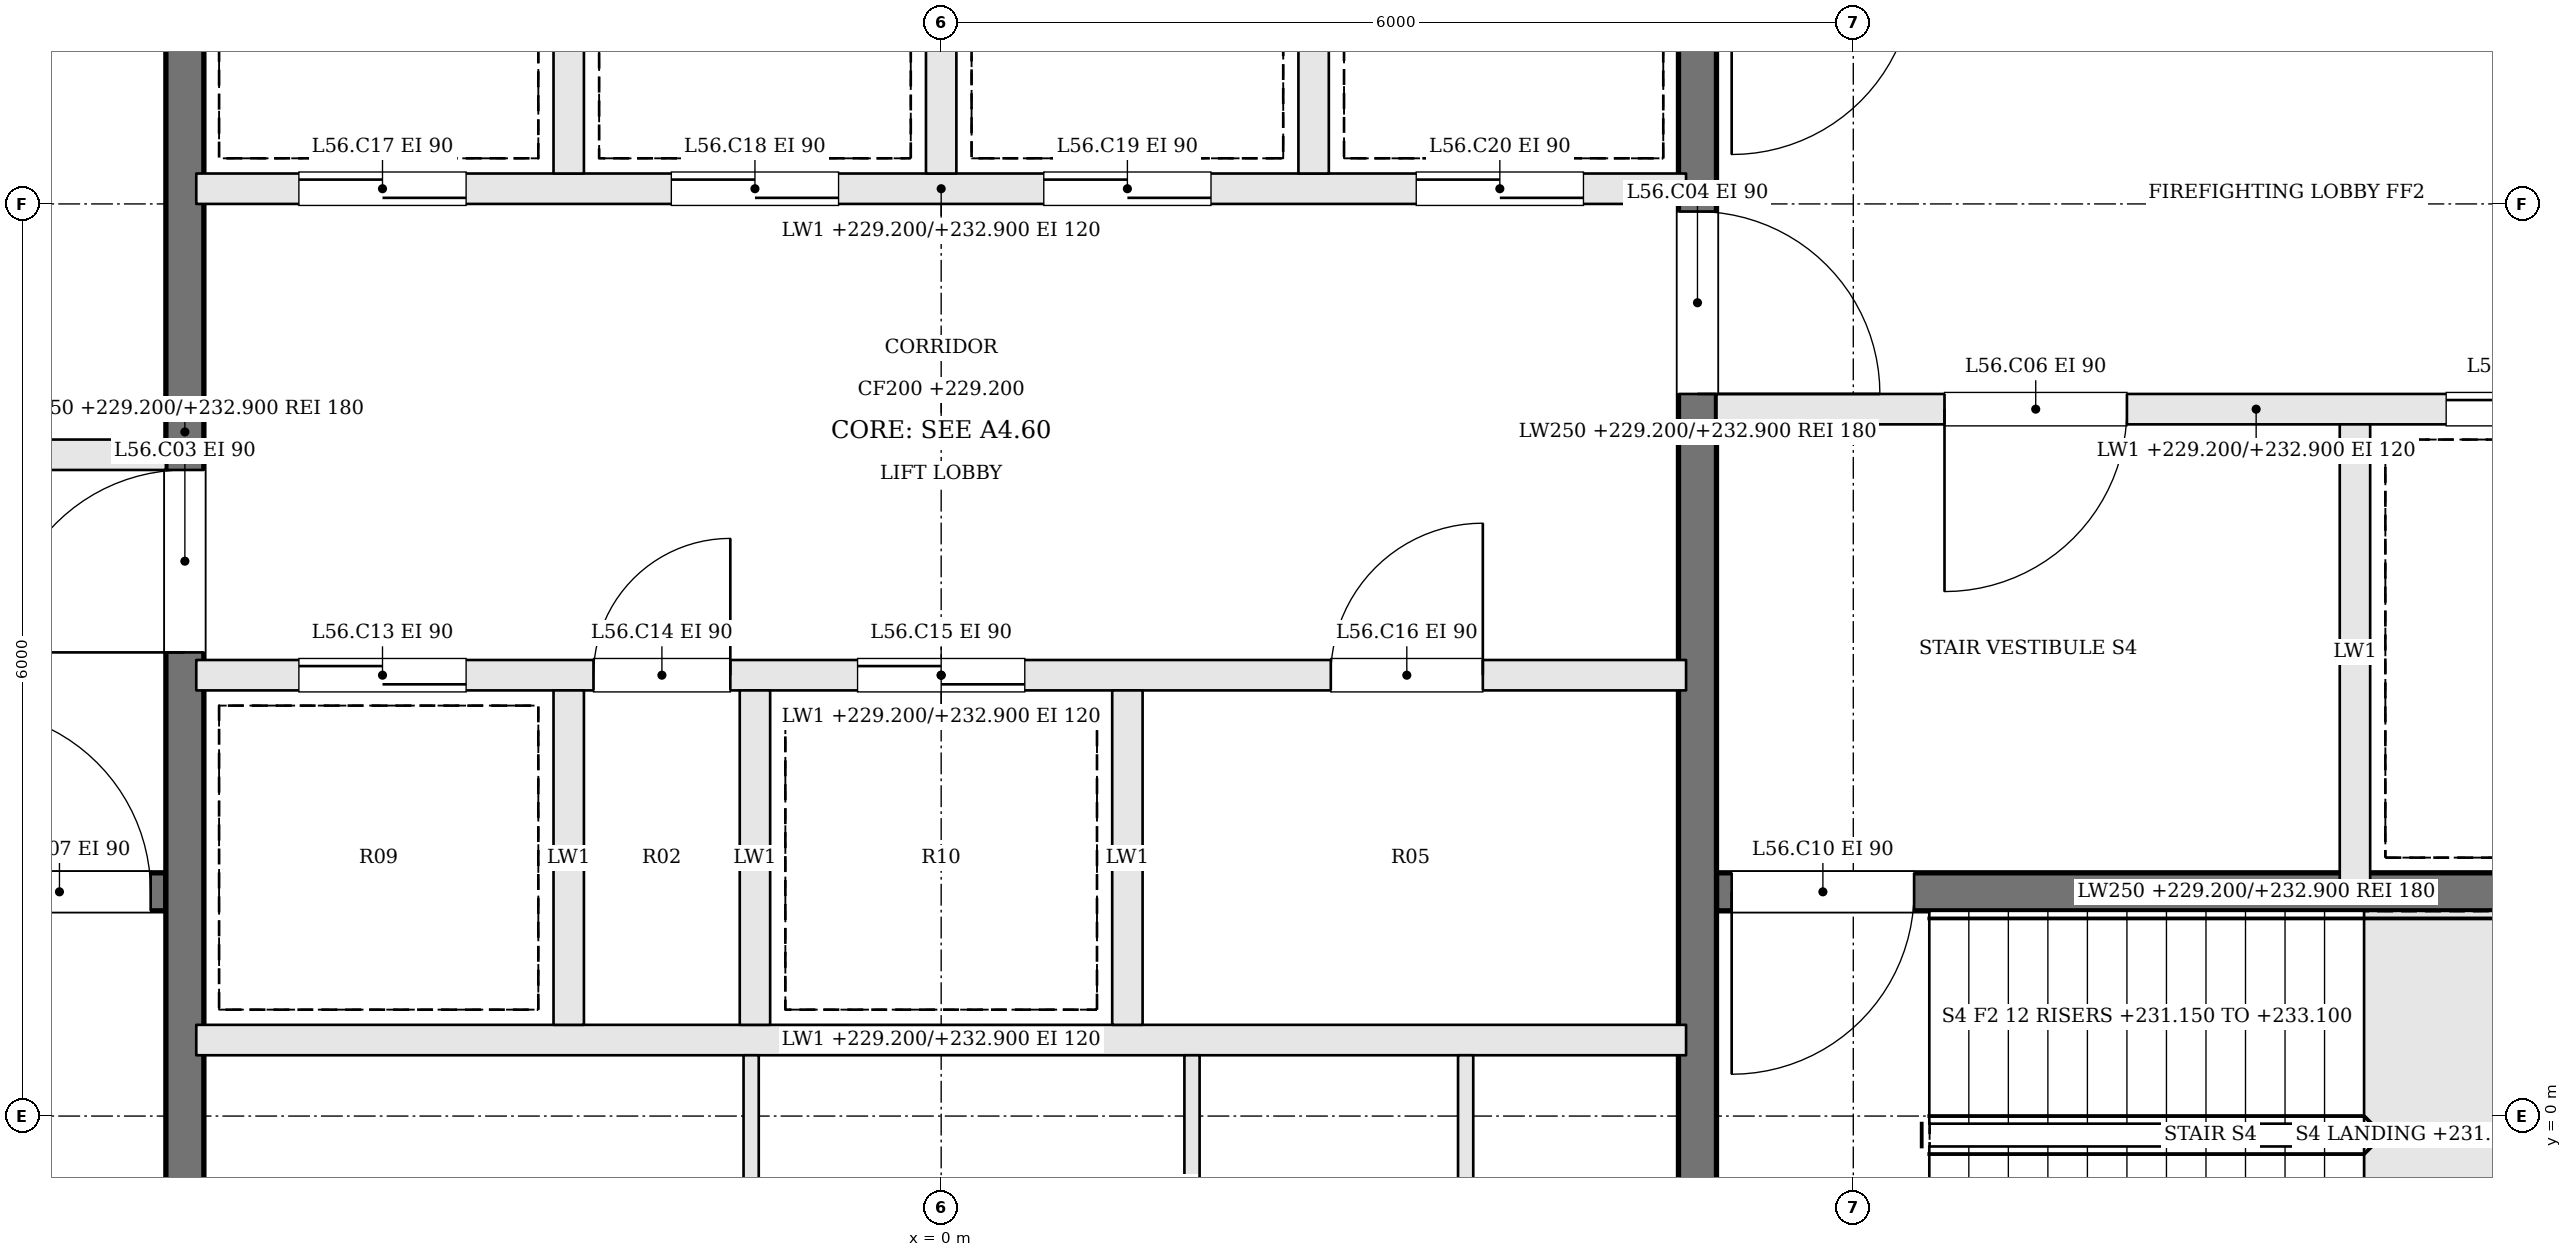
"""IFC4 building model, lengths in metres.
Left out: names, types, materials, properties, quantities, classifications, styles, units other than length and angle.
Written with IfcOpenShell. Run it as: python <this file> out.ifc"""

import sys

from ifc_helpers import new_model, si_unit, direction, frame, frame_2d, origin, place, context, subcontext, project, spatial, rectangle, extrude, element, fill, save


model = new_model("IFC4")
c1 = context("Model", 3, precision=1e-05, world=origin(), true_north=direction((0.0, 1.0)))
c2 = subcontext(c1, "Body", "Model", "MODEL_VIEW")
j1 = project(units=[si_unit("LENGTHUNIT", "METRE"), si_unit("PLANEANGLEUNIT", "RADIAN")], contexts=[c1])
p1 = place(None, origin())
s1 = spatial("IfcSite", under=j1, at=p1, CompositionType="ELEMENT")
p2 = place(p1, origin())
s2 = spatial("IfcBuilding", under=s1, at=p2, CompositionType="ELEMENT")
p3 = place(p2, frame((0.0, 0.0, 229.2)))
s3 = spatial("IfcBuildingStorey", under=s2, at=p3, CompositionType="ELEMENT", Elevation=229.2)
p4 = place(p3, frame((-12.2, 1.475, 0.0), z_axis=(0.0, 0.0, 1.0), x_axis=(1.0, 0.0, 0.0)))
e1 = element("IfcWall", 1, at=p4, inside=s3, PredefinedType="SOLIDWALL", context=c2, shape_type="SweptSolid", body=[
    extrude(rectangle(XDim=7.1, YDim=0.25, at=frame_2d((3.55, 0.0))), origin(), (0.0, 0.0, 1.0), 3.7),
])
p5 = place(p4, frame((5.8, 0.0, 0.0)))
e2 = element("IfcOpeningElement", 2, at=p5, cuts=e1, PredefinedType="OPENING", context=c2, shape_type="SweptSolid", body=[
    extrude(rectangle(XDim=1.2, YDim=2.1, at=frame_2d((0.6, 1.05))), frame((0.0, 0.135, 0.0), z_axis=(0.0, -1.0, 0.0), x_axis=(1.0, 0.0, 0.0)), (0.0, 0.0, 1.0), 0.27),
])
p6 = place(p3, frame((-12.2, 4.35, 0.0), z_axis=(0.0, 0.0, 1.0), x_axis=(1.0, 0.0, 0.0)))
e3 = element("IfcWall", 3, at=p6, inside=s3, PredefinedType="SOLIDWALL", context=c2, shape_type="SweptSolid", body=[
    extrude(rectangle(XDim=7.1, YDim=0.2, at=frame_2d((3.55, 0.0))), origin(), (0.0, 0.0, 1.0), 3.7),
])
p7 = place(p6, frame((4.4, 0.0, 0.0)))
e4 = element("IfcOpeningElement", 4, at=p7, cuts=e3, PredefinedType="OPENING", context=c2, shape_type="SweptSolid", body=[
    extrude(rectangle(XDim=1.2, YDim=2.1, at=frame_2d((0.6, 1.05))), frame((0.0, 0.11, 0.0), z_axis=(0.0, -1.0, 0.0), x_axis=(1.0, 0.0, 0.0)), (0.0, 0.0, 1.0), 0.22),
])
p8 = place(p6, frame((1.1, 0.0, 0.0)))
e5 = element("IfcOpeningElement", 5, at=p8, cuts=e3, PredefinedType="OPENING", context=c2, shape_type="SweptSolid", body=[
    extrude(rectangle(XDim=1.2, YDim=2.1, at=frame_2d((0.6, 1.05))), frame((0.0, 0.11, 0.0), z_axis=(0.0, -1.0, 0.0), x_axis=(1.0, 0.0, 0.0)), (0.0, 0.0, 1.0), 0.22),
])
p9 = place(p3, frame((12.2, 4.65, 0.0), z_axis=(0.0, 0.0, 1.0), x_axis=(-1.0, 0.0, 0.0)))
e6 = element("IfcWall", 6, at=p9, inside=s3, PredefinedType="SOLIDWALL", context=c2, shape_type="SweptSolid", body=[
    extrude(rectangle(XDim=7.1, YDim=0.2, at=frame_2d((3.55, 0.0))), origin(), (0.0, 0.0, 1.0), 3.7),
])
p10 = place(p9, frame((4.4, 0.0, 0.0)))
e7 = element("IfcOpeningElement", 7, at=p10, cuts=e6, PredefinedType="OPENING", context=c2, shape_type="SweptSolid", body=[
    extrude(rectangle(XDim=1.2, YDim=2.1, at=frame_2d((0.6, 1.05))), frame((0.0, 0.11, 0.0), z_axis=(0.0, -1.0, 0.0), x_axis=(1.0, 0.0, 0.0)), (0.0, 0.0, 1.0), 0.22),
])
p11 = place(p9, frame((1.1, 0.0, 0.0)))
e8 = element("IfcOpeningElement", 8, at=p11, cuts=e6, PredefinedType="OPENING", context=c2, shape_type="SweptSolid", body=[
    extrude(rectangle(XDim=1.2, YDim=2.1, at=frame_2d((0.6, 1.05))), frame((0.0, 0.11, 0.0), z_axis=(0.0, -1.0, 0.0), x_axis=(1.0, 0.0, 0.0)), (0.0, 0.0, 1.0), 0.22),
])
p12 = place(p3, frame((12.2, 1.475, 0.0), z_axis=(0.0, 0.0, 1.0), x_axis=(-1.0, 0.0, 0.0)))
e9 = element("IfcWall", 9, at=p12, inside=s3, PredefinedType="SOLIDWALL", context=c2, shape_type="SweptSolid", body=[
    extrude(rectangle(XDim=7.1, YDim=0.25, at=frame_2d((3.55, 0.0))), origin(), (0.0, 0.0, 1.0), 3.7),
])
p13 = place(p12, frame((5.8, 0.0, 0.0)))
e10 = element("IfcOpeningElement", 10, at=p13, cuts=e9, PredefinedType="OPENING", context=c2, shape_type="SweptSolid", body=[
    extrude(rectangle(XDim=1.2, YDim=2.1, at=frame_2d((0.6, 1.05))), frame((0.0, 0.135, 0.0), z_axis=(0.0, -1.0, 0.0), x_axis=(1.0, 0.0, 0.0)), (0.0, 0.0, 1.0), 0.27),
])
p14 = place(p3, frame((9.3, 4.55, 0.0), z_axis=(0.0, 0.0, 1.0), x_axis=(0.0, -1.0, 0.0)))
e11 = element("IfcWall", 11, at=p14, inside=s3, PredefinedType="SOLIDWALL", context=c2, shape_type="SweptSolid", body=[
    extrude(rectangle(XDim=3.0, YDim=0.2, at=frame_2d((1.5, 0.0))), origin(), (0.0, 0.0, 1.0), 3.7),
])
p15 = place(p3, frame((-4.975, -2.2, 0.0), z_axis=(0.0, 0.0, 1.0), x_axis=(0.0, 1.0, 0.0)))
e12 = element("IfcWall", 12, at=p15, inside=s3, PredefinedType="SOLIDWALL", context=c2, shape_type="SweptSolid", body=[
    extrude(rectangle(XDim=13.4, YDim=0.25, at=frame_2d((6.7, 0.0))), origin(), (0.0, 0.0, 1.0), 3.7),
])
p16 = place(p15, frame((5.25, 0.0, 0.0)))
e13 = element("IfcOpeningElement", 13, at=p16, cuts=e12, PredefinedType="OPENING", context=c2, shape_type="SweptSolid", body=[
    extrude(rectangle(XDim=1.2, YDim=2.1, at=frame_2d((0.6, 1.05))), frame((0.0, 0.135, 0.0), z_axis=(0.0, -1.0, 0.0), x_axis=(1.0, 0.0, 0.0)), (0.0, 0.0, 1.0), 0.27),
])
p17 = place(p3, frame((4.975, 11.2, 0.0), z_axis=(0.0, 0.0, 1.0), x_axis=(0.0, -1.0, 0.0)))
e14 = element("IfcWall", 14, at=p17, inside=s3, PredefinedType="SOLIDWALL", context=c2, shape_type="SweptSolid", body=[
    extrude(rectangle(XDim=13.4, YDim=0.25, at=frame_2d((6.7, 0.0))), origin(), (0.0, 0.0, 1.0), 3.7),
])
p18 = place(p17, frame((5.25, 0.0, 0.0)))
e15 = element("IfcOpeningElement", 15, at=p18, cuts=e14, PredefinedType="OPENING", context=c2, shape_type="SweptSolid", body=[
    extrude(rectangle(XDim=1.2, YDim=2.1, at=frame_2d((0.6, 1.05))), frame((0.0, 0.135, 0.0), z_axis=(0.0, -1.0, 0.0), x_axis=(1.0, 0.0, 0.0)), (0.0, 0.0, 1.0), 0.27),
])
p19 = place(p3, frame((-4.9, 0.5, 0.0), z_axis=(0.0, 0.0, 1.0), x_axis=(1.0, 0.0, 0.0)))
e16 = element("IfcWall", 16, at=p19, inside=s3, PredefinedType="SOLIDWALL", context=c2, shape_type="SweptSolid", body=[
    extrude(rectangle(XDim=9.8, YDim=0.2, at=frame_2d((4.9, 0.0))), origin(), (0.0, 0.0, 1.0), 3.7),
])
p20 = place(p3, frame((-4.9, 2.9, 0.0), z_axis=(0.0, 0.0, 1.0), x_axis=(1.0, 0.0, 0.0)))
e17 = element("IfcWall", 17, at=p20, inside=s3, PredefinedType="SOLIDWALL", context=c2, shape_type="SweptSolid", body=[
    extrude(rectangle(XDim=9.8, YDim=0.2, at=frame_2d((4.9, 0.0))), origin(), (0.0, 0.0, 1.0), 3.7),
])
p21 = place(p20, frame((0.675, 0.0, 0.0)))
e18 = element("IfcOpeningElement", 18, at=p21, cuts=e17, PredefinedType="OPENING", context=c2, shape_type="SweptSolid", body=[
    extrude(rectangle(XDim=1.1, YDim=2.1, at=frame_2d((0.55, 1.05))), frame((0.0, 0.11, 0.0), z_axis=(0.0, -1.0, 0.0), x_axis=(1.0, 0.0, 0.0)), (0.0, 0.0, 1.0), 0.22),
])
p22 = place(p20, frame((2.613, 0.0, 0.0)))
e19 = element("IfcOpeningElement", 19, at=p22, cuts=e17, PredefinedType="OPENING", context=c2, shape_type="SweptSolid", body=[
    extrude(rectangle(XDim=0.9, YDim=2.1, at=frame_2d((0.45, 1.05))), frame((0.0, 0.11, 0.0), z_axis=(0.0, -1.0, 0.0), x_axis=(1.0, 0.0, 0.0)), (0.0, 0.0, 1.0), 0.22),
])
p23 = place(p20, frame((4.35, 0.0, 0.0)))
e20 = element("IfcOpeningElement", 20, at=p23, cuts=e17, PredefinedType="OPENING", context=c2, shape_type="SweptSolid", body=[
    extrude(rectangle(XDim=1.1, YDim=2.1, at=frame_2d((0.55, 1.05))), frame((0.0, 0.11, 0.0), z_axis=(0.0, -1.0, 0.0), x_axis=(1.0, 0.0, 0.0)), (0.0, 0.0, 1.0), 0.22),
])
p24 = place(p20, frame((7.463, 0.0, 0.0)))
e21 = element("IfcOpeningElement", 21, at=p24, cuts=e17, PredefinedType="OPENING", context=c2, shape_type="SweptSolid", body=[
    extrude(rectangle(XDim=1.0, YDim=2.1, at=frame_2d((0.5, 1.05))), frame((0.0, 0.11, 0.0), z_axis=(0.0, -1.0, 0.0), x_axis=(1.0, 0.0, 0.0)), (0.0, 0.0, 1.0), 0.22),
])
p25 = place(p3, frame((-4.9, 6.1, 0.0), z_axis=(0.0, 0.0, 1.0), x_axis=(1.0, 0.0, 0.0)))
e22 = element("IfcWall", 22, at=p25, inside=s3, PredefinedType="SOLIDWALL", context=c2, shape_type="SweptSolid", body=[
    extrude(rectangle(XDim=9.8, YDim=0.2, at=frame_2d((4.9, 0.0))), origin(), (0.0, 0.0, 1.0), 3.7),
])
p26 = place(p25, frame((0.675, 0.0, 0.0)))
e23 = element("IfcOpeningElement", 23, at=p26, cuts=e22, PredefinedType="OPENING", context=c2, shape_type="SweptSolid", body=[
    extrude(rectangle(XDim=1.1, YDim=2.1, at=frame_2d((0.55, 1.05))), frame((0.0, 0.11, 0.0), z_axis=(0.0, -1.0, 0.0), x_axis=(1.0, 0.0, 0.0)), (0.0, 0.0, 1.0), 0.22),
])
p27 = place(p25, frame((3.125, 0.0, 0.0)))
e24 = element("IfcOpeningElement", 24, at=p27, cuts=e22, PredefinedType="OPENING", context=c2, shape_type="SweptSolid", body=[
    extrude(rectangle(XDim=1.1, YDim=2.1, at=frame_2d((0.55, 1.05))), frame((0.0, 0.11, 0.0), z_axis=(0.0, -1.0, 0.0), x_axis=(1.0, 0.0, 0.0)), (0.0, 0.0, 1.0), 0.22),
])
p28 = place(p25, frame((5.575, 0.0, 0.0)))
e25 = element("IfcOpeningElement", 25, at=p28, cuts=e22, PredefinedType="OPENING", context=c2, shape_type="SweptSolid", body=[
    extrude(rectangle(XDim=1.1, YDim=2.1, at=frame_2d((0.55, 1.05))), frame((0.0, 0.11, 0.0), z_axis=(0.0, -1.0, 0.0), x_axis=(1.0, 0.0, 0.0)), (0.0, 0.0, 1.0), 0.22),
])
p29 = place(p25, frame((8.025, 0.0, 0.0)))
e26 = element("IfcOpeningElement", 26, at=p29, cuts=e22, PredefinedType="OPENING", context=c2, shape_type="SweptSolid", body=[
    extrude(rectangle(XDim=1.1, YDim=2.1, at=frame_2d((0.55, 1.05))), frame((0.0, 0.11, 0.0), z_axis=(0.0, -1.0, 0.0), x_axis=(1.0, 0.0, 0.0)), (0.0, 0.0, 1.0), 0.22),
])
for number, where, z_axis, x_axis in (
    (27, (-2.45, 0.6, 0.0), (0.0, 0.0, 1.0), (0.0, 1.0, 0.0)),
    (28, (-1.225, 0.6, 0.0), (0.0, 0.0, 1.0), (0.0, 1.0, 0.0)),
    (29, (1.225, 0.6, 0.0), (0.0, 0.0, 1.0), (0.0, 1.0, 0.0)),
    (30, (-2.45, 6.2, 0.0), (0.0, 0.0, 1.0), (0.0, 1.0, 0.0)),
    (31, (0.0, 6.2, 0.0), (0.0, 0.0, 1.0), (0.0, 1.0, 0.0)),
    (32, (2.45, 6.2, 0.0), (0.0, 0.0, 1.0), (0.0, 1.0, 0.0)),
):
    element("IfcWall", number, at=place(p3, frame(where, z_axis=z_axis, x_axis=x_axis)), inside=s3, PredefinedType="SOLIDWALL", context=c2, shape_type="SweptSolid", body=[
        extrude(rectangle(XDim=2.2, YDim=0.2, at=frame_2d((1.1, 0.0))), origin(), (0.0, 0.0, 1.0), 3.7),
    ])
for number, where, z_axis, x_axis in (
    (33, (-1.25, -2.2, 0.0), (0.0, 0.0, 1.0), (0.0, 1.0, 0.0)),
    (34, (1.65, -2.2, 0.0), (0.0, 0.0, 1.0), (0.0, 1.0, 0.0)),
    (35, (3.45, -2.2, 0.0), (0.0, 0.0, 1.0), (0.0, 1.0, 0.0)),
):
    element("IfcWall", number, at=place(p3, frame(where, z_axis=z_axis, x_axis=x_axis)), inside=s3, PredefinedType="PARTITIONING", context=c2, shape_type="SweptSolid", body=[
        extrude(rectangle(XDim=2.6, YDim=0.1, at=frame_2d((1.3, 0.0))), origin(), (0.0, 0.0, 1.0), 3.7),
    ])
p30 = place(p16, origin())
e36 = element("IfcDoor", 36, at=p30, inside=s3, OperationType="SINGLE_SWING_LEFT", PredefinedType="DOOR", context=c2, shape_type="SweptSolid", body=[
    extrude(rectangle(XDim=1.2, YDim=2.1, at=frame_2d((0.6, 1.05))), frame((0.0, 0.025, 0.0), z_axis=(0.0, -1.0, 0.0), x_axis=(1.0, 0.0, 0.0)), (0.0, 0.0, 1.0), 0.05),
])
fill(e13, e36)
p31 = place(p18, origin())
e37 = element("IfcDoor", 37, at=p31, inside=s3, OperationType="SINGLE_SWING_RIGHT", PredefinedType="DOOR", context=c2, shape_type="SweptSolid", body=[
    extrude(rectangle(XDim=1.2, YDim=2.1, at=frame_2d((0.6, 1.05))), frame((0.0, 0.025, 0.0), z_axis=(0.0, -1.0, 0.0), x_axis=(1.0, 0.0, 0.0)), (0.0, 0.0, 1.0), 0.05),
])
fill(e15, e37)
p32 = place(p10, origin())
e38 = element("IfcDoor", 38, at=p32, inside=s3, OperationType="SINGLE_SWING_RIGHT", PredefinedType="DOOR", context=c2, shape_type="SweptSolid", body=[
    extrude(rectangle(XDim=1.2, YDim=2.1, at=frame_2d((0.6, 1.05))), frame((0.0, 0.025, 0.0), z_axis=(0.0, -1.0, 0.0), x_axis=(1.0, 0.0, 0.0)), (0.0, 0.0, 1.0), 0.05),
])
fill(e7, e38)
p33 = place(p5, origin())
e39 = element("IfcDoor", 39, at=p33, inside=s3, OperationType="SINGLE_SWING_LEFT", PredefinedType="DOOR", context=c2, shape_type="SweptSolid", body=[
    extrude(rectangle(XDim=1.2, YDim=2.1, at=frame_2d((0.6, 1.05))), frame((0.0, 0.025, 0.0), z_axis=(0.0, -1.0, 0.0), x_axis=(1.0, 0.0, 0.0)), (0.0, 0.0, 1.0), 0.05),
])
fill(e2, e39)
p34 = place(p13, origin())
e40 = element("IfcDoor", 40, at=p34, inside=s3, OperationType="SINGLE_SWING_RIGHT", PredefinedType="DOOR", context=c2, shape_type="SweptSolid", body=[
    extrude(rectangle(XDim=1.2, YDim=2.1, at=frame_2d((0.6, 1.05))), frame((0.0, 0.025, 0.0), z_axis=(0.0, -1.0, 0.0), x_axis=(1.0, 0.0, 0.0)), (0.0, 0.0, 1.0), 0.05),
])
fill(e10, e40)
p35 = place(p11, origin())
e41 = element("IfcDoor", 41, at=p35, inside=s3, OperationType="SLIDING_TO_RIGHT", PredefinedType="DOOR", context=c2, shape_type="SweptSolid", body=[
    extrude(rectangle(XDim=1.2, YDim=2.1, at=frame_2d((0.6, 1.05))), frame((0.0, 0.025, 0.0), z_axis=(0.0, -1.0, 0.0), x_axis=(1.0, 0.0, 0.0)), (0.0, 0.0, 1.0), 0.05),
])
fill(e8, e41)
p36 = place(p21, origin())
e42 = element("IfcDoor", 42, at=p36, inside=s3, OperationType="SLIDING_TO_RIGHT", PredefinedType="DOOR", context=c2, shape_type="SweptSolid", body=[
    extrude(rectangle(XDim=1.1, YDim=2.1, at=frame_2d((0.55, 1.05))), frame((0.0, 0.025, 0.0), z_axis=(0.0, -1.0, 0.0), x_axis=(1.0, 0.0, 0.0)), (0.0, 0.0, 1.0), 0.05),
])
fill(e18, e42)
p37 = place(p22, origin())
e43 = element("IfcDoor", 43, at=p37, inside=s3, OperationType="SINGLE_SWING_RIGHT", PredefinedType="DOOR", context=c2, shape_type="SweptSolid", body=[
    extrude(rectangle(XDim=0.9, YDim=2.1, at=frame_2d((0.45, 1.05))), frame((0.0, 0.025, 0.0), z_axis=(0.0, -1.0, 0.0), x_axis=(1.0, 0.0, 0.0)), (0.0, 0.0, 1.0), 0.05),
])
fill(e19, e43)
p38 = place(p23, origin())
e44 = element("IfcDoor", 44, at=p38, inside=s3, OperationType="SLIDING_TO_LEFT", PredefinedType="DOOR", context=c2, shape_type="SweptSolid", body=[
    extrude(rectangle(XDim=1.1, YDim=2.1, at=frame_2d((0.55, 1.05))), frame((0.0, 0.025, 0.0), z_axis=(0.0, -1.0, 0.0), x_axis=(1.0, 0.0, 0.0)), (0.0, 0.0, 1.0), 0.05),
])
fill(e20, e44)
p39 = place(p24, origin())
e45 = element("IfcDoor", 45, at=p39, inside=s3, OperationType="SINGLE_SWING_RIGHT", PredefinedType="DOOR", context=c2, shape_type="SweptSolid", body=[
    extrude(rectangle(XDim=1.0, YDim=2.1, at=frame_2d((0.5, 1.05))), frame((0.0, 0.025, 0.0), z_axis=(0.0, -1.0, 0.0), x_axis=(1.0, 0.0, 0.0)), (0.0, 0.0, 1.0), 0.05),
])
fill(e21, e45)
p40 = place(p26, origin())
e46 = element("IfcDoor", 46, at=p40, inside=s3, OperationType="SLIDING_TO_RIGHT", PredefinedType="DOOR", context=c2, shape_type="SweptSolid", body=[
    extrude(rectangle(XDim=1.1, YDim=2.1, at=frame_2d((0.55, 1.05))), frame((0.0, 0.025, 0.0), z_axis=(0.0, -1.0, 0.0), x_axis=(1.0, 0.0, 0.0)), (0.0, 0.0, 1.0), 0.05),
])
fill(e23, e46)
p41 = place(p27, origin())
e47 = element("IfcDoor", 47, at=p41, inside=s3, OperationType="SLIDING_TO_LEFT", PredefinedType="DOOR", context=c2, shape_type="SweptSolid", body=[
    extrude(rectangle(XDim=1.1, YDim=2.1, at=frame_2d((0.55, 1.05))), frame((0.0, 0.025, 0.0), z_axis=(0.0, -1.0, 0.0), x_axis=(1.0, 0.0, 0.0)), (0.0, 0.0, 1.0), 0.05),
])
fill(e24, e47)
p42 = place(p28, origin())
e48 = element("IfcDoor", 48, at=p42, inside=s3, OperationType="SLIDING_TO_RIGHT", PredefinedType="DOOR", context=c2, shape_type="SweptSolid", body=[
    extrude(rectangle(XDim=1.1, YDim=2.1, at=frame_2d((0.55, 1.05))), frame((0.0, 0.025, 0.0), z_axis=(0.0, -1.0, 0.0), x_axis=(1.0, 0.0, 0.0)), (0.0, 0.0, 1.0), 0.05),
])
fill(e25, e48)
p43 = place(p29, origin())
e49 = element("IfcDoor", 49, at=p43, inside=s3, OperationType="SLIDING_TO_LEFT", PredefinedType="DOOR", context=c2, shape_type="SweptSolid", body=[
    extrude(rectangle(XDim=1.1, YDim=2.1, at=frame_2d((0.55, 1.05))), frame((0.0, 0.025, 0.0), z_axis=(0.0, -1.0, 0.0), x_axis=(1.0, 0.0, 0.0)), (0.0, 0.0, 1.0), 0.05),
])
fill(e26, e49)
save(model, sys.argv[1])
